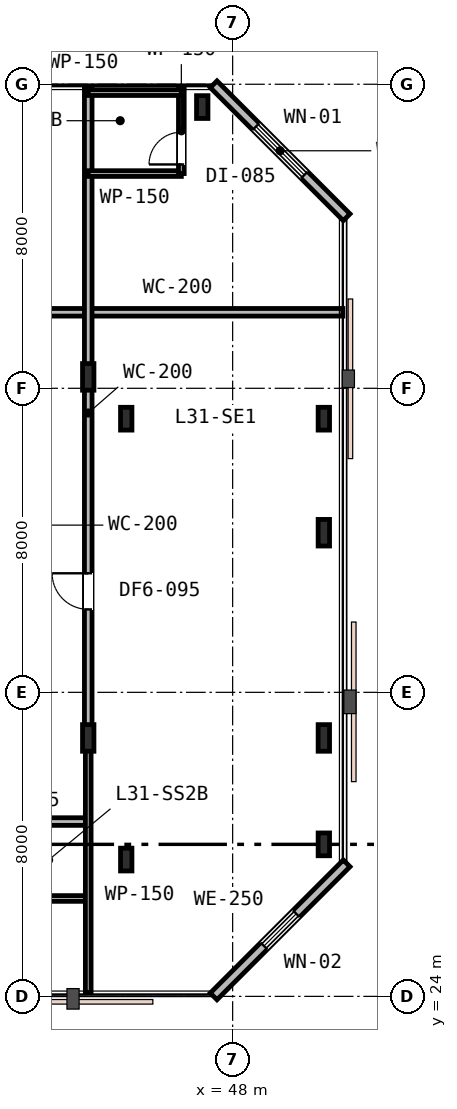
"""IFC4 building model, lengths in metres.
Left out: names, types, materials, properties, quantities, classifications, styles, units other than length and angle.
Written with IfcOpenShell. Run it as: python <this file> out.ifc"""

import sys

from ifc_helpers import new_model, si_unit, direction, frame, frame_2d, origin, origin_2d, place, context, subcontext, project, spatial, rectangle, i_section, extrude, element, fill, save


model = new_model("IFC4")
c1 = context("Model", 3, precision=1e-05, world=origin(), true_north=direction((0.0, 1.0)))
c2 = subcontext(c1, "Body", "Model", "MODEL_VIEW")
j1 = project(units=[si_unit("LENGTHUNIT", "METRE"), si_unit("PLANEANGLEUNIT", "RADIAN")], contexts=[c1])
p1 = place(None, origin())
s1 = spatial("IfcSite", under=j1, at=p1, CompositionType="ELEMENT")
p2 = place(p1, origin())
s2 = spatial("IfcBuilding", under=s1, at=p2, CompositionType="ELEMENT")
p3 = place(p2, frame((0.0, 0.0, 122.4)))
s3 = spatial("IfcBuildingStorey", under=s2, at=p3, CompositionType="ELEMENT", Elevation=122.4)
for number, where, z_axis, x_axis in (
    (1, (45.2, 27.6, 0.0), (0.0, 0.0, 1.0), (1.0, 0.0, 0.0)),
    (2, (45.2, 39.2, 0.0), (0.0, 0.0, 1.0), (1.0, 0.0, 0.0)),
    (3, (47.2, 47.4, 0.0), (0.0, 0.0, 1.0), (1.0, 0.0, 0.0)),
    (4, (50.4, 28.0, 0.0), (0.0, 0.0, 1.0), (1.0, 0.0, 0.0)),
    (5, (50.4, 39.2, 0.0), (0.0, 0.0, 1.0), (1.0, 0.0, 0.0)),
):
    element("IfcColumn", number, at=place(p3, frame(where, z_axis=z_axis, x_axis=x_axis)), inside=s3, PredefinedType="COLUMN", context=c2, shape_type="SweptSolid", body=[
        extrude(i_section(OverallWidth=0.3, OverallDepth=0.6, WebThickness=0.015, FlangeThickness=0.03, FilletRadius=0.027, at=origin_2d()), origin(), (0.0, 0.0, 1.0), 3.6),
    ])
for number, where, z_axis, x_axis in (
    (6, (44.2, 30.8, 0.0), (0.0, 0.0, 1.0), (1.0, 0.0, 0.0)),
    (7, (44.2, 40.3, 0.0), (0.0, 0.0, 1.0), (1.0, 0.0, 0.0)),
    (8, (50.4, 30.8, 0.0), (0.0, 0.0, 1.0), (1.0, 0.0, 0.0)),
    (9, (50.4, 36.2, 0.0), (0.0, 0.0, 1.0), (1.0, 0.0, 0.0)),
):
    element("IfcColumn", number, at=place(p3, frame(where, z_axis=z_axis, x_axis=x_axis)), inside=s3, PredefinedType="COLUMN", context=c2, shape_type="SweptSolid", body=[
        extrude(i_section(OverallWidth=0.3, OverallDepth=0.7, WebThickness=0.017, FlangeThickness=0.032, FilletRadius=0.027, at=origin_2d()), origin(), (0.0, 0.0, 1.0), 3.6),
    ])
p4 = place(p3, frame((47.5, 24.0, 0.0), z_axis=(0.0, 0.0, 1.0), x_axis=(0.707106781187, 0.707106781187, 0.0)))
e10 = element("IfcWall", 10, at=p4, inside=s3, PredefinedType="STANDARD", context=c2, shape_type="SweptSolid", body=[
    extrude(rectangle(XDim=4.95, YDim=0.25, at=frame_2d((2.475, 0.0))), origin(), (0.0, 0.0, 1.0), 3.33),
])
p5 = place(p4, frame((1.875, 0.0, 0.85)))
e11 = element("IfcOpeningElement", 11, at=p5, cuts=e10, PredefinedType="OPENING", context=c2, shape_type="SweptSolid", body=[
    extrude(rectangle(XDim=1.2, YDim=1.6, at=frame_2d((0.6, 0.8))), frame((0.0, 0.135, 0.0), z_axis=(0.0, -1.0, 0.0), x_axis=(1.0, 0.0, 0.0)), (0.0, 0.0, 1.0), 0.27),
])
p6 = place(p3, frame((51.0, 44.5, 0.0), z_axis=(0.0, 0.0, 1.0), x_axis=(-0.707106781187, 0.707106781187, 0.0)))
e12 = element("IfcWall", 12, at=p6, inside=s3, PredefinedType="STANDARD", context=c2, shape_type="SweptSolid", body=[
    extrude(rectangle(XDim=4.95, YDim=0.25, at=frame_2d((2.475, 0.0))), origin(), (0.0, 0.0, 1.0), 3.33),
])
p7 = place(p6, frame((1.575, 0.0, 0.75)))
e13 = element("IfcOpeningElement", 13, at=p7, cuts=e12, PredefinedType="OPENING", context=c2, shape_type="SweptSolid", body=[
    extrude(rectangle(XDim=1.8, YDim=1.85, at=frame_2d((0.9, 0.925))), frame((0.0, 0.135, 0.0), z_axis=(0.0, -1.0, 0.0), x_axis=(1.0, 0.0, 0.0)), (0.0, 0.0, 1.0), 0.27),
])
p8 = place(p3, frame((7.2, 28.6, 0.0), z_axis=(0.0, 0.0, 1.0), x_axis=(1.0, 0.0, 0.0)))
e14 = element("IfcWall", 14, at=p8, inside=s3, PredefinedType="PARTITIONING", context=c2, shape_type="SweptSolid", body=[
    extrude(rectangle(XDim=37.0, YDim=0.2, at=frame_2d((18.5, 0.0))), origin(), (0.0, 0.0, 1.0), 2.87),
])
p9 = place(p8, frame((19.71, 0.0, 0.0)))
e15 = element("IfcOpeningElement", 15, at=p9, cuts=e14, PredefinedType="OPENING", context=c2, shape_type="SweptSolid", body=[
    extrude(rectangle(XDim=0.95, YDim=2.15, at=frame_2d((0.475, 1.075))), frame((0.0, 0.11, 0.0), z_axis=(0.0, -1.0, 0.0), x_axis=(1.0, 0.0, 0.0)), (0.0, 0.0, 1.0), 0.22),
])
p10 = place(p8, frame((29.78, 0.0, 0.0)))
e16 = element("IfcOpeningElement", 16, at=p10, cuts=e14, PredefinedType="OPENING", context=c2, shape_type="SweptSolid", body=[
    extrude(rectangle(XDim=0.95, YDim=2.15, at=frame_2d((0.475, 1.075))), frame((0.0, 0.11, 0.0), z_axis=(0.0, -1.0, 0.0), x_axis=(1.0, 0.0, 0.0)), (0.0, 0.0, 1.0), 0.22),
])
p11 = place(p3, frame((42.2, 42.0, 0.0), z_axis=(0.0, 0.0, 1.0), x_axis=(1.0, 0.0, 0.0)))
e17 = element("IfcWall", 17, at=p11, inside=s3, PredefinedType="PARTITIONING", context=c2, shape_type="SweptSolid", body=[
    extrude(rectangle(XDim=8.7, YDim=0.2, at=frame_2d((4.35, 0.0))), origin(), (0.0, 0.0, 1.0), 3.33),
])
p12 = place(p3, frame((41.75, 26.576, 0.0), z_axis=(0.0, 0.0, 1.0), x_axis=(1.0, 0.0, 0.0)))
e18 = element("IfcWall", 18, at=p12, inside=s3, PredefinedType="PARTITIONING", context=c2, shape_type="SweptSolid", body=[
    extrude(rectangle(XDim=2.45, YDim=0.15, at=frame_2d((1.225, 0.0))), origin(), (0.0, 0.0, 1.0), 3.33),
])
p13 = place(p3, frame((44.2, 30.8, 0.0), z_axis=(0.0, 0.0, 1.0), x_axis=(0.0, -1.0, 0.0)))
e19 = element("IfcWall", 19, at=p13, inside=s3, PredefinedType="PARTITIONING", context=c2, shape_type="SweptSolid", body=[
    extrude(rectangle(XDim=6.7, YDim=0.15, at=frame_2d((3.35, 0.0))), origin(), (0.0, 0.0, 1.0), 2.87),
])
p14 = place(p3, frame((44.2, 30.8, 0.0), z_axis=(0.0, 0.0, 1.0), x_axis=(0.0, 1.0, 0.0)))
e20 = element("IfcWall", 20, at=p14, inside=s3, PredefinedType="PARTITIONING", context=c2, shape_type="SweptSolid", body=[
    extrude(rectangle(XDim=17.1, YDim=0.2, at=frame_2d((8.55, 0.0))), origin(), (0.0, 0.0, 1.0), 2.87),
])
p15 = place(p14, frame((3.382, 0.0, 0.0)))
e21 = element("IfcOpeningElement", 21, at=p15, cuts=e20, PredefinedType="OPENING", context=c2, shape_type="SweptSolid", body=[
    extrude(rectangle(XDim=0.95, YDim=2.15, at=frame_2d((0.475, 1.075))), frame((0.0, 0.11, 0.0), z_axis=(0.0, -1.0, 0.0), x_axis=(1.0, 0.0, 0.0)), (0.0, 0.0, 1.0), 0.22),
])
p16 = place(p3, frame((44.2, 45.65, 0.0), z_axis=(0.0, 0.0, 1.0), x_axis=(1.0, 0.0, 0.0)))
e22 = element("IfcWall", 22, at=p16, inside=s3, PredefinedType="PARTITIONING", context=c2, shape_type="SweptSolid", body=[
    extrude(rectangle(XDim=2.45, YDim=0.15, at=frame_2d((1.225, 0.0))), origin(), (0.0, 0.0, 1.0), 3.33),
])
p17 = place(p3, frame((46.65, 45.65, 0.0), z_axis=(0.0, 0.0, 1.0), x_axis=(0.0, 1.0, 0.0)))
e23 = element("IfcWall", 23, at=p17, inside=s3, PredefinedType="PARTITIONING", context=c2, shape_type="SweptSolid", body=[
    extrude(rectangle(XDim=2.25, YDim=0.15, at=frame_2d((1.125, 0.0))), origin(), (0.0, 0.0, 1.0), 2.96),
])
p18 = place(p17, frame((0.24, 0.0, 0.0)))
e24 = element("IfcOpeningElement", 24, at=p18, cuts=e23, PredefinedType="OPENING", context=c2, shape_type="SweptSolid", body=[
    extrude(rectangle(XDim=0.85, YDim=2.15, at=frame_2d((0.425, 1.075))), frame((0.0, 0.085, 0.0), z_axis=(0.0, -1.0, 0.0), x_axis=(1.0, 0.0, 0.0)), (0.0, 0.0, 1.0), 0.17),
])
p19 = place(p3, frame((44.2, 47.78, 0.0), z_axis=(0.0, 0.0, 1.0), x_axis=(1.0, 0.0, 0.0)))
e25 = element("IfcWall", 25, at=p19, inside=s3, PredefinedType="PARTITIONING", context=c2, shape_type="SweptSolid", body=[
    extrude(rectangle(XDim=2.45, YDim=0.15, at=frame_2d((1.225, 0.0))), origin(), (0.0, 0.0, 1.0), 2.96),
])
p20 = place(p5, origin())
e26 = element("IfcWindow", 26, at=p20, inside=s3, PartitioningType="SINGLE_PANEL", PredefinedType="WINDOW", context=c2, shape_type="SweptSolid", body=[
    extrude(rectangle(XDim=1.2, YDim=1.6, at=frame_2d((0.6, 0.8))), frame((0.0, 0.03, 0.0), z_axis=(0.0, -1.0, 0.0), x_axis=(1.0, 0.0, 0.0)), (0.0, 0.0, 1.0), 0.06),
])
fill(e11, e26)
p21 = place(p7, origin())
e27 = element("IfcWindow", 27, at=p21, inside=s3, PartitioningType="SINGLE_PANEL", PredefinedType="WINDOW", context=c2, shape_type="SweptSolid", body=[
    extrude(rectangle(XDim=1.8, YDim=1.85, at=frame_2d((0.9, 0.925))), frame((0.0, 0.03, 0.0), z_axis=(0.0, -1.0, 0.0), x_axis=(1.0, 0.0, 0.0)), (0.0, 0.0, 1.0), 0.06),
])
fill(e13, e27)
p22 = place(p15, origin())
e28 = element("IfcDoor", 28, at=p22, inside=s3, OperationType="SINGLE_SWING_RIGHT", PredefinedType="DOOR", context=c2, shape_type="SweptSolid", body=[
    extrude(rectangle(XDim=0.95, YDim=2.15, at=frame_2d((0.475, 1.075))), frame((0.0, 0.025, 0.0), z_axis=(0.0, -1.0, 0.0), x_axis=(1.0, 0.0, 0.0)), (0.0, 0.0, 1.0), 0.05),
])
fill(e21, e28)
p23 = place(p18, origin())
e29 = element("IfcDoor", 29, at=p23, inside=s3, OperationType="SINGLE_SWING_LEFT", PredefinedType="DOOR", context=c2, shape_type="SweptSolid", body=[
    extrude(rectangle(XDim=0.85, YDim=2.15, at=frame_2d((0.425, 1.075))), frame((0.0, 0.025, 0.0), z_axis=(0.0, -1.0, 0.0), x_axis=(1.0, 0.0, 0.0)), (0.0, 0.0, 1.0), 0.05),
])
fill(e24, e29)
save(model, sys.argv[1])
